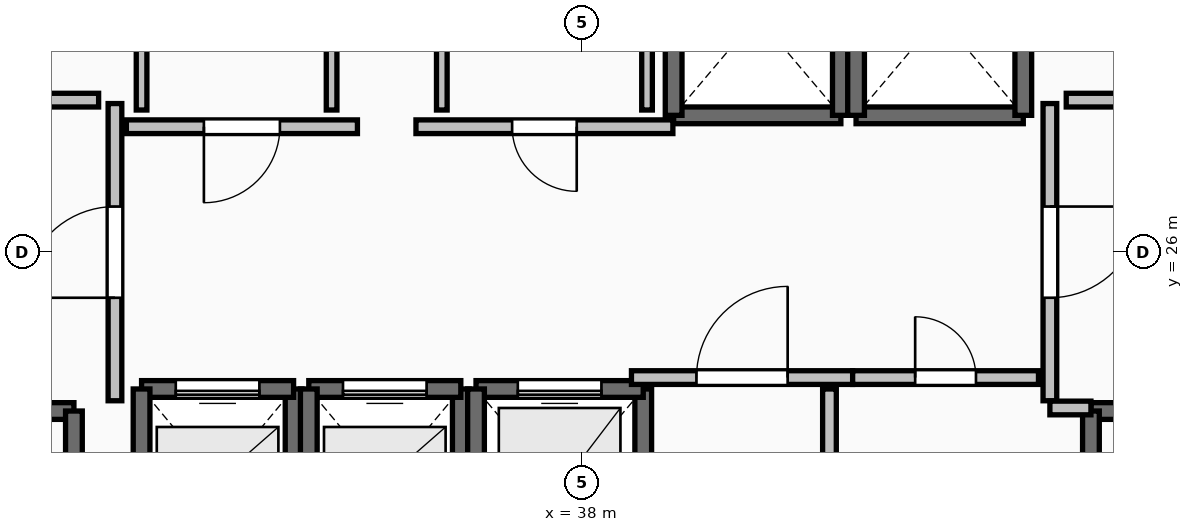
"""IFC4 building model, lengths in metres.
Left out: names, types, materials, properties, quantities, classifications, styles, units other than length and angle.
Written with IfcOpenShell. Run it as: python <this file> out.ifc"""

import sys

from ifc_helpers import new_model, si_unit, direction, frame, frame_2d, origin, place, context, subcontext, project, spatial, rectangle, extrude, element, fill, save


model = new_model("IFC4")
c1 = context("Model", 3, precision=1e-05, world=origin(), true_north=direction((0.0, 1.0)))
c2 = subcontext(c1, "Body", "Model", "MODEL_VIEW")
j1 = project(units=[si_unit("LENGTHUNIT", "METRE"), si_unit("PLANEANGLEUNIT", "RADIAN")], contexts=[c1])
p1 = place(None, origin())
s1 = spatial("IfcSite", under=j1, at=p1, CompositionType="ELEMENT")
p2 = place(p1, origin())
s2 = spatial("IfcBuilding", under=s1, at=p2, CompositionType="ELEMENT")
p3 = place(p2, frame((0.0, 0.0, 203.65)))
s3 = spatial("IfcBuildingStorey", under=s2, at=p3, CompositionType="ELEMENT", Elevation=203.65)
p4 = place(p3, frame((27.94, 23.91, 0.0), z_axis=(0.0, 0.0, 1.0), x_axis=(1.0, 0.0, 0.0)))
e1 = element("IfcWall", 1, at=p4, inside=s3, PredefinedType="SOLIDWALL", context=c2, shape_type="SweptSolid", body=[
    extrude(rectangle(XDim=3.37, YDim=0.22, at=frame_2d((1.685, 0.0))), origin(), (0.0, 0.0, 1.0), 3.29),
])
p5 = place(p4, frame((1.135, 0.0, 0.0)))
e2 = element("IfcOpeningElement", 2, at=p5, cuts=e1, PredefinedType="OPENING", context=c2, shape_type="SweptSolid", body=[
    extrude(rectangle(XDim=1.1, YDim=2.15, at=frame_2d((0.55, 1.075))), frame((0.0, 0.125, 0.0), z_axis=(0.0, -1.0, 0.0), x_axis=(1.0, 0.0, 0.0)), (0.0, 0.0, 1.0), 0.25),
])
p6 = place(p3, frame((31.31, 23.91, 0.0), z_axis=(0.0, 0.0, 1.0), x_axis=(0.0, -1.0, 0.0)))
e3 = element("IfcWall", 3, at=p6, inside=s3, PredefinedType="SOLIDWALL", context=c2, shape_type="SweptSolid", body=[
    extrude(rectangle(XDim=7.42, YDim=0.22, at=frame_2d((3.71, 0.0))), origin(), (0.0, 0.0, 1.0), 3.29),
])
p7 = place(p3, frame((44.69, 23.91, 0.0), z_axis=(0.0, 0.0, 1.0), x_axis=(1.0, 0.0, 0.0)))
e4 = element("IfcWall", 4, at=p7, inside=s3, PredefinedType="SOLIDWALL", context=c2, shape_type="SweptSolid", body=[
    extrude(rectangle(XDim=3.37, YDim=0.22, at=frame_2d((1.685, 0.0))), origin(), (0.0, 0.0, 1.0), 3.29),
])
p8 = place(p7, frame((1.135, 0.0, 0.0)))
e5 = element("IfcOpeningElement", 5, at=p8, cuts=e4, PredefinedType="OPENING", context=c2, shape_type="SweptSolid", body=[
    extrude(rectangle(XDim=1.1, YDim=2.15, at=frame_2d((0.55, 1.075))), frame((0.0, 0.125, 0.0), z_axis=(0.0, -1.0, 0.0), x_axis=(1.0, 0.0, 0.0)), (0.0, 0.0, 1.0), 0.25),
])
p9 = place(p3, frame((44.69, 16.49, 0.0), z_axis=(0.0, 0.0, 1.0), x_axis=(0.0, 1.0, 0.0)))
e6 = element("IfcWall", 6, at=p9, inside=s3, PredefinedType="SOLIDWALL", context=c2, shape_type="SweptSolid", body=[
    extrude(rectangle(XDim=7.42, YDim=0.22, at=frame_2d((3.71, 0.0))), origin(), (0.0, 0.0, 1.0), 3.29),
])
p10 = place(p3, frame((34.2, 21.8, 0.0), z_axis=(0.0, 0.0, 1.0), x_axis=(0.0, 1.0, 0.0)))
e7 = element("IfcWall", 7, at=p10, inside=s3, PredefinedType="SOLIDWALL", context=c2, shape_type="SweptSolid", body=[
    extrude(rectangle(XDim=2.4, YDim=0.22, at=frame_2d((1.2, 0.0))), origin(), (0.0, 0.0, 1.0), 3.29),
])
p11 = place(p3, frame((34.2, 24.2, 0.0), z_axis=(0.0, 0.0, 1.0), x_axis=(-1.0, 0.0, 0.0)))
e8 = element("IfcWall", 8, at=p11, inside=s3, PredefinedType="SOLIDWALL", context=c2, shape_type="SweptSolid", body=[
    extrude(rectangle(XDim=2.0, YDim=0.22, at=frame_2d((1.0, 0.0))), origin(), (0.0, 0.0, 1.0), 3.29),
])
p12 = place(p11, frame((0.45, 0.0, 0.0)))
e9 = element("IfcOpeningElement", 9, at=p12, cuts=e8, PredefinedType="OPENING", context=c2, shape_type="SweptSolid", body=[
    extrude(rectangle(XDim=1.1, YDim=2.2, at=frame_2d((0.55, 1.1))), frame((0.0, 0.125, 0.0), z_axis=(0.0, -1.0, 0.0), x_axis=(1.0, 0.0, 0.0)), (0.0, 0.0, 1.0), 0.25),
])
for number, where, z_axis, x_axis in (
    (10, (32.2, 24.2, 0.0), (0.0, 0.0, 1.0), (0.0, -1.0, 0.0)),
    (11, (36.4, 21.8, 0.0), (0.0, 0.0, 1.0), (0.0, 1.0, 0.0)),
):
    element("IfcWall", number, at=place(p3, frame(where, z_axis=z_axis, x_axis=x_axis)), inside=s3, PredefinedType="SOLIDWALL", context=c2, shape_type="SweptSolid", body=[
        extrude(rectangle(XDim=2.4, YDim=0.22, at=frame_2d((1.2, 0.0))), origin(), (0.0, 0.0, 1.0), 3.29),
    ])
p13 = place(p3, frame((36.4, 24.2, 0.0), z_axis=(0.0, 0.0, 1.0), x_axis=(-1.0, 0.0, 0.0)))
e12 = element("IfcWall", 12, at=p13, inside=s3, PredefinedType="SOLIDWALL", context=c2, shape_type="SweptSolid", body=[
    extrude(rectangle(XDim=2.0, YDim=0.22, at=frame_2d((1.0, 0.0))), origin(), (0.0, 0.0, 1.0), 3.29),
])
p14 = place(p13, frame((0.45, 0.0, 0.0)))
e13 = element("IfcOpeningElement", 13, at=p14, cuts=e12, PredefinedType="OPENING", context=c2, shape_type="SweptSolid", body=[
    extrude(rectangle(XDim=1.1, YDim=2.2, at=frame_2d((0.55, 1.1))), frame((0.0, 0.125, 0.0), z_axis=(0.0, -1.0, 0.0), x_axis=(1.0, 0.0, 0.0)), (0.0, 0.0, 1.0), 0.25),
])
p15 = place(p3, frame((34.4, 24.2, 0.0), z_axis=(0.0, 0.0, 1.0), x_axis=(0.0, -1.0, 0.0)))
e14 = element("IfcWall", 14, at=p15, inside=s3, PredefinedType="SOLIDWALL", context=c2, shape_type="SweptSolid", body=[
    extrude(rectangle(XDim=2.4, YDim=0.22, at=frame_2d((1.2, 0.0))), origin(), (0.0, 0.0, 1.0), 3.29),
])
p16 = place(p3, frame((38.8, 21.6, 0.0), z_axis=(0.0, 0.0, 1.0), x_axis=(0.0, 1.0, 0.0)))
e15 = element("IfcWall", 15, at=p16, inside=s3, PredefinedType="SOLIDWALL", context=c2, shape_type="SweptSolid", body=[
    extrude(rectangle(XDim=2.6, YDim=0.22, at=frame_2d((1.3, 0.0))), origin(), (0.0, 0.0, 1.0), 3.29),
])
p17 = place(p3, frame((38.8, 24.2, 0.0), z_axis=(0.0, 0.0, 1.0), x_axis=(-1.0, 0.0, 0.0)))
e16 = element("IfcWall", 16, at=p17, inside=s3, PredefinedType="SOLIDWALL", context=c2, shape_type="SweptSolid", body=[
    extrude(rectangle(XDim=2.2, YDim=0.22, at=frame_2d((1.1, 0.0))), origin(), (0.0, 0.0, 1.0), 3.29),
])
p18 = place(p17, frame((0.55, 0.0, 0.0)))
e17 = element("IfcOpeningElement", 17, at=p18, cuts=e16, PredefinedType="OPENING", context=c2, shape_type="SweptSolid", body=[
    extrude(rectangle(XDim=1.1, YDim=2.2, at=frame_2d((0.55, 1.1))), frame((0.0, 0.125, 0.0), z_axis=(0.0, -1.0, 0.0), x_axis=(1.0, 0.0, 0.0)), (0.0, 0.0, 1.0), 0.25),
])
p19 = place(p3, frame((36.6, 24.2, 0.0), z_axis=(0.0, 0.0, 1.0), x_axis=(0.0, -1.0, 0.0)))
e18 = element("IfcWall", 18, at=p19, inside=s3, PredefinedType="SOLIDWALL", context=c2, shape_type="SweptSolid", body=[
    extrude(rectangle(XDim=2.6, YDim=0.22, at=frame_2d((1.3, 0.0))), origin(), (0.0, 0.0, 1.0), 3.29),
])
p20 = place(p3, frame((39.2, 27.8, 0.0), z_axis=(0.0, 0.0, 1.0), x_axis=(1.0, 0.0, 0.0)))
e19 = element("IfcWall", 19, at=p20, inside=s3, PredefinedType="SOLIDWALL", context=c2, shape_type="SweptSolid", body=[
    extrude(rectangle(XDim=2.2, YDim=0.22, at=frame_2d((1.1, 0.0))), origin(), (0.0, 0.0, 1.0), 3.29),
])
for number, where, z_axis, x_axis in (
    (20, (41.4, 27.8, 0.0), (0.0, 0.0, 1.0), (0.0, 1.0, 0.0)),
    (21, (39.2, 30.4, 0.0), (0.0, 0.0, 1.0), (0.0, -1.0, 0.0)),
):
    element("IfcWall", number, at=place(p3, frame(where, z_axis=z_axis, x_axis=x_axis)), inside=s3, PredefinedType="SOLIDWALL", context=c2, shape_type="SweptSolid", body=[
        extrude(rectangle(XDim=2.6, YDim=0.22, at=frame_2d((1.3, 0.0))), origin(), (0.0, 0.0, 1.0), 3.29),
    ])
p21 = place(p3, frame((41.6, 27.8, 0.0), z_axis=(0.0, 0.0, 1.0), x_axis=(1.0, 0.0, 0.0)))
e22 = element("IfcWall", 22, at=p21, inside=s3, PredefinedType="SOLIDWALL", context=c2, shape_type="SweptSolid", body=[
    extrude(rectangle(XDim=2.2, YDim=0.22, at=frame_2d((1.1, 0.0))), origin(), (0.0, 0.0, 1.0), 3.29),
])
for number, where, z_axis, x_axis in (
    (23, (43.8, 27.8, 0.0), (0.0, 0.0, 1.0), (0.0, 1.0, 0.0)),
    (24, (41.6, 30.4, 0.0), (0.0, 0.0, 1.0), (0.0, -1.0, 0.0)),
):
    element("IfcWall", number, at=place(p3, frame(where, z_axis=z_axis, x_axis=x_axis)), inside=s3, PredefinedType="SOLIDWALL", context=c2, shape_type="SweptSolid", body=[
        extrude(rectangle(XDim=2.6, YDim=0.22, at=frame_2d((1.3, 0.0))), origin(), (0.0, 0.0, 1.0), 3.29),
    ])
p22 = place(p3, frame((31.85, 24.045, 0.0), z_axis=(0.0, 0.0, 1.0), x_axis=(0.0, 1.0, 0.0)))
e25 = element("IfcWall", 25, at=p22, inside=s3, PredefinedType="PARTITIONING", context=c2, shape_type="SweptSolid", body=[
    extrude(rectangle(XDim=3.91, YDim=0.18, at=frame_2d((1.955, 0.0))), origin(), (0.0, 0.0, 1.0), 3.29),
])
p23 = place(p22, frame((1.355, 0.0, 0.0)))
e26 = element("IfcOpeningElement", 26, at=p23, cuts=e25, PredefinedType="OPENING", context=c2, shape_type="SweptSolid", body=[
    extrude(rectangle(XDim=1.2, YDim=2.15, at=frame_2d((0.6, 1.075))), frame((0.0, 0.105, 0.0), z_axis=(0.0, -1.0, 0.0), x_axis=(1.0, 0.0, 0.0)), (0.0, 0.0, 1.0), 0.21),
])
p24 = place(p3, frame((44.15, 27.955, 0.0), z_axis=(0.0, 0.0, 1.0), x_axis=(0.0, -1.0, 0.0)))
e27 = element("IfcWall", 27, at=p24, inside=s3, PredefinedType="PARTITIONING", context=c2, shape_type="SweptSolid", body=[
    extrude(rectangle(XDim=3.91, YDim=0.18, at=frame_2d((1.955, 0.0))), origin(), (0.0, 0.0, 1.0), 3.29),
])
p25 = place(p24, frame((1.355, 0.0, 0.0)))
e28 = element("IfcOpeningElement", 28, at=p25, cuts=e27, PredefinedType="OPENING", context=c2, shape_type="SweptSolid", body=[
    extrude(rectangle(XDim=1.2, YDim=2.15, at=frame_2d((0.6, 1.075))), frame((0.0, 0.105, 0.0), z_axis=(0.0, -1.0, 0.0), x_axis=(1.0, 0.0, 0.0)), (0.0, 0.0, 1.0), 0.21),
])
p26 = place(p3, frame((44.15, 23.95, 0.0), z_axis=(0.0, 0.0, 1.0), x_axis=(1.0, 0.0, 0.0)))
e29 = element("IfcWall", 29, at=p26, inside=s3, PredefinedType="PARTITIONING", context=c2, shape_type="SweptSolid", body=[
    extrude(rectangle(XDim=0.54, YDim=0.18, at=frame_2d((0.27, 0.0))), origin(), (0.0, 0.0, 1.0), 3.29),
])
p27 = place(p3, frame((38.645, 24.35, 0.0), z_axis=(0.0, 0.0, 1.0), x_axis=(1.0, 0.0, 0.0)))
e30 = element("IfcWall", 30, at=p27, inside=s3, PredefinedType="PARTITIONING", context=c2, shape_type="SweptSolid", body=[
    extrude(rectangle(XDim=2.91, YDim=0.18, at=frame_2d((1.455, 0.0))), origin(), (0.0, 0.0, 1.0), 3.29),
])
p28 = place(p27, frame((0.855, 0.0, 0.0)))
e31 = element("IfcOpeningElement", 31, at=p28, cuts=e30, PredefinedType="OPENING", context=c2, shape_type="SweptSolid", body=[
    extrude(rectangle(XDim=1.2, YDim=2.15, at=frame_2d((0.6, 1.075))), frame((0.0, 0.105, 0.0), z_axis=(0.0, -1.0, 0.0), x_axis=(1.0, 0.0, 0.0)), (0.0, 0.0, 1.0), 0.21),
])
p29 = place(p3, frame((41.555, 24.35, 0.0), z_axis=(0.0, 0.0, 1.0), x_axis=(1.0, 0.0, 0.0)))
e32 = element("IfcWall", 32, at=p29, inside=s3, PredefinedType="PARTITIONING", context=c2, shape_type="SweptSolid", body=[
    extrude(rectangle(XDim=2.445, YDim=0.18, at=frame_2d((1.223, 0.0))), origin(), (0.0, 0.0, 1.0), 3.29),
])
p30 = place(p29, frame((0.823, 0.0, 0.0)))
e33 = element("IfcOpeningElement", 33, at=p30, cuts=e32, PredefinedType="OPENING", context=c2, shape_type="SweptSolid", body=[
    extrude(rectangle(XDim=0.8, YDim=2.05, at=frame_2d((0.4, 1.025))), frame((0.0, 0.105, 0.0), z_axis=(0.0, -1.0, 0.0), x_axis=(1.0, 0.0, 0.0)), (0.0, 0.0, 1.0), 0.21),
])
p31 = place(p3, frame((35.04, 27.65, 0.0), z_axis=(0.0, 0.0, 1.0), x_axis=(-1.0, 0.0, 0.0)))
e34 = element("IfcWall", 34, at=p31, inside=s3, PredefinedType="PARTITIONING", context=c2, shape_type="SweptSolid", body=[
    extrude(rectangle(XDim=3.04, YDim=0.18, at=frame_2d((1.52, 0.0))), origin(), (0.0, 0.0, 1.0), 3.29),
])
p32 = place(p31, frame((1.02, 0.0, 0.0)))
e35 = element("IfcOpeningElement", 35, at=p32, cuts=e34, PredefinedType="OPENING", context=c2, shape_type="SweptSolid", body=[
    extrude(rectangle(XDim=1.0, YDim=2.15, at=frame_2d((0.5, 1.075))), frame((0.0, 0.105, 0.0), z_axis=(0.0, -1.0, 0.0), x_axis=(1.0, 0.0, 0.0)), (0.0, 0.0, 1.0), 0.21),
])
p33 = place(p3, frame((39.19, 27.65, 0.0), z_axis=(0.0, 0.0, 1.0), x_axis=(-1.0, 0.0, 0.0)))
e36 = element("IfcWall", 36, at=p33, inside=s3, PredefinedType="PARTITIONING", context=c2, shape_type="SweptSolid", body=[
    extrude(rectangle(XDim=3.38, YDim=0.18, at=frame_2d((1.69, 0.0))), origin(), (0.0, 0.0, 1.0), 3.29),
])
p34 = place(p33, frame((1.265, 0.0, 0.0)))
e37 = element("IfcOpeningElement", 37, at=p34, cuts=e36, PredefinedType="OPENING", context=c2, shape_type="SweptSolid", body=[
    extrude(rectangle(XDim=0.85, YDim=2.1, at=frame_2d((0.425, 1.05))), frame((0.0, 0.105, 0.0), z_axis=(0.0, -1.0, 0.0), x_axis=(1.0, 0.0, 0.0)), (0.0, 0.0, 1.0), 0.21),
])
p35 = place(p3, frame((41.25, 16.32, 0.0), z_axis=(0.0, 0.0, 1.0), x_axis=(0.0, 1.0, 0.0)))
e38 = element("IfcWall", 38, at=p35, inside=s3, PredefinedType="PARTITIONING", context=c2, shape_type="SweptSolid", body=[
    extrude(rectangle(XDim=7.88, YDim=0.18, at=frame_2d((3.94, 0.0))), origin(), (0.0, 0.0, 1.0), 3.29),
])
p36 = place(p35, frame((3.54, 0.0, 0.0)))
e39 = element("IfcOpeningElement", 39, at=p36, cuts=e38, PredefinedType="OPENING", context=c2, shape_type="SweptSolid", body=[
    extrude(rectangle(XDim=0.8, YDim=2.05, at=frame_2d((0.4, 1.025))), frame((0.0, 0.105, 0.0), z_axis=(0.0, -1.0, 0.0), x_axis=(1.0, 0.0, 0.0)), (0.0, 0.0, 1.0), 0.21),
])
for number, where, z_axis, x_axis in (
    (40, (31.635, 28.0, 0.0), (0.0, 0.0, 1.0), (-1.0, 0.0, 0.0)),
    (41, (45.28, 28.0, 0.0), (0.0, 0.0, 1.0), (-1.0, 0.0, 0.0)),
):
    element("IfcWall", number, at=place(p3, frame(where, z_axis=z_axis, x_axis=x_axis)), inside=s3, PredefinedType="PARTITIONING", context=c2, shape_type="SweptSolid", body=[
        extrude(rectangle(XDim=0.915, YDim=0.18, at=frame_2d((0.458, 0.0))), origin(), (0.0, 0.0, 1.0), 3.29),
    ])
for number, where, z_axis, x_axis in (
    (42, (32.2, 30.26, 0.0), (0.0, 0.0, 1.0), (0.0, -1.0, 0.0)),
    (43, (34.7, 27.87, 0.0), (0.0, 0.0, 1.0), (0.0, 1.0, 0.0)),
):
    element("IfcWall", number, at=place(p3, frame(where, z_axis=z_axis, x_axis=x_axis)), inside=s3, PredefinedType="PARTITIONING", context=c2, shape_type="SweptSolid", body=[
        extrude(rectangle(XDim=2.39, YDim=0.14, at=frame_2d((1.195, 0.0))), origin(), (0.0, 0.0, 1.0), 3.29),
    ])
p37 = place(p3, frame((36.15, 30.03, 0.0), z_axis=(0.0, 0.0, 1.0), x_axis=(0.0, -1.0, 0.0)))
e44 = element("IfcWall", 44, at=p37, inside=s3, PredefinedType="PARTITIONING", context=c2, shape_type="SweptSolid", body=[
    extrude(rectangle(XDim=2.16, YDim=0.14, at=frame_2d((1.08, 0.0))), origin(), (0.0, 0.0, 1.0), 3.29),
])
p38 = place(p3, frame((38.85, 27.87, 0.0), z_axis=(0.0, 0.0, 1.0), x_axis=(0.0, 1.0, 0.0)))
e45 = element("IfcWall", 45, at=p38, inside=s3, PredefinedType="PARTITIONING", context=c2, shape_type="SweptSolid", body=[
    extrude(rectangle(XDim=2.39, YDim=0.14, at=frame_2d((1.195, 0.0))), origin(), (0.0, 0.0, 1.0), 3.29),
])
p39 = place(p12, origin())
e46 = element("IfcDoor", 46, at=p39, inside=s3, OperationType="SLIDING_TO_LEFT", PredefinedType="DOOR", context=c2, shape_type="SweptSolid", body=[
    extrude(rectangle(XDim=1.1, YDim=2.2, at=frame_2d((0.55, 1.1))), frame((0.0, 0.025, 0.0), z_axis=(0.0, -1.0, 0.0), x_axis=(1.0, 0.0, 0.0)), (0.0, 0.0, 1.0), 0.05),
])
fill(e9, e46)
p40 = place(p14, origin())
e47 = element("IfcDoor", 47, at=p40, inside=s3, OperationType="SLIDING_TO_LEFT", PredefinedType="DOOR", context=c2, shape_type="SweptSolid", body=[
    extrude(rectangle(XDim=1.1, YDim=2.2, at=frame_2d((0.55, 1.1))), frame((0.0, 0.025, 0.0), z_axis=(0.0, -1.0, 0.0), x_axis=(1.0, 0.0, 0.0)), (0.0, 0.0, 1.0), 0.05),
])
fill(e13, e47)
p41 = place(p18, origin())
e48 = element("IfcDoor", 48, at=p41, inside=s3, OperationType="SLIDING_TO_LEFT", PredefinedType="DOOR", context=c2, shape_type="SweptSolid", body=[
    extrude(rectangle(XDim=1.1, YDim=2.2, at=frame_2d((0.55, 1.1))), frame((0.0, 0.025, 0.0), z_axis=(0.0, -1.0, 0.0), x_axis=(1.0, 0.0, 0.0)), (0.0, 0.0, 1.0), 0.05),
])
fill(e17, e48)
p42 = place(p23, origin())
e49 = element("IfcDoor", 49, at=p42, inside=s3, OperationType="SINGLE_SWING_LEFT", PredefinedType="DOOR", context=c2, shape_type="SweptSolid", body=[
    extrude(rectangle(XDim=1.2, YDim=2.15, at=frame_2d((0.6, 1.075))), frame((0.0, 0.025, 0.0), z_axis=(0.0, -1.0, 0.0), x_axis=(1.0, 0.0, 0.0)), (0.0, 0.0, 1.0), 0.05),
])
fill(e26, e49)
p43 = place(p25, origin())
e50 = element("IfcDoor", 50, at=p43, inside=s3, OperationType="SINGLE_SWING_LEFT", PredefinedType="DOOR", context=c2, shape_type="SweptSolid", body=[
    extrude(rectangle(XDim=1.2, YDim=2.15, at=frame_2d((0.6, 1.075))), frame((0.0, 0.025, 0.0), z_axis=(0.0, -1.0, 0.0), x_axis=(1.0, 0.0, 0.0)), (0.0, 0.0, 1.0), 0.05),
])
fill(e28, e50)
p44 = place(p28, origin())
e51 = element("IfcDoor", 51, at=p44, inside=s3, OperationType="SINGLE_SWING_RIGHT", PredefinedType="DOOR", context=c2, shape_type="SweptSolid", body=[
    extrude(rectangle(XDim=1.2, YDim=2.15, at=frame_2d((0.6, 1.075))), frame((0.0, 0.025, 0.0), z_axis=(0.0, -1.0, 0.0), x_axis=(1.0, 0.0, 0.0)), (0.0, 0.0, 1.0), 0.05),
])
fill(e31, e51)
p45 = place(p30, origin())
e52 = element("IfcDoor", 52, at=p45, inside=s3, OperationType="SINGLE_SWING_LEFT", PredefinedType="DOOR", context=c2, shape_type="SweptSolid", body=[
    extrude(rectangle(XDim=0.8, YDim=2.05, at=frame_2d((0.4, 1.025))), frame((0.0, 0.025, 0.0), z_axis=(0.0, -1.0, 0.0), x_axis=(1.0, 0.0, 0.0)), (0.0, 0.0, 1.0), 0.05),
])
fill(e33, e52)
p46 = place(p32, origin())
e53 = element("IfcDoor", 53, at=p46, inside=s3, OperationType="SINGLE_SWING_RIGHT", PredefinedType="DOOR", context=c2, shape_type="SweptSolid", body=[
    extrude(rectangle(XDim=1.0, YDim=2.15, at=frame_2d((0.5, 1.075))), frame((0.0, 0.025, 0.0), z_axis=(0.0, -1.0, 0.0), x_axis=(1.0, 0.0, 0.0)), (0.0, 0.0, 1.0), 0.05),
])
fill(e35, e53)
p47 = place(p34, origin())
e54 = element("IfcDoor", 54, at=p47, inside=s3, OperationType="SINGLE_SWING_LEFT", PredefinedType="DOOR", context=c2, shape_type="SweptSolid", body=[
    extrude(rectangle(XDim=0.85, YDim=2.1, at=frame_2d((0.425, 1.05))), frame((0.0, 0.025, 0.0), z_axis=(0.0, -1.0, 0.0), x_axis=(1.0, 0.0, 0.0)), (0.0, 0.0, 1.0), 0.05),
])
fill(e37, e54)
save(model, sys.argv[1])
